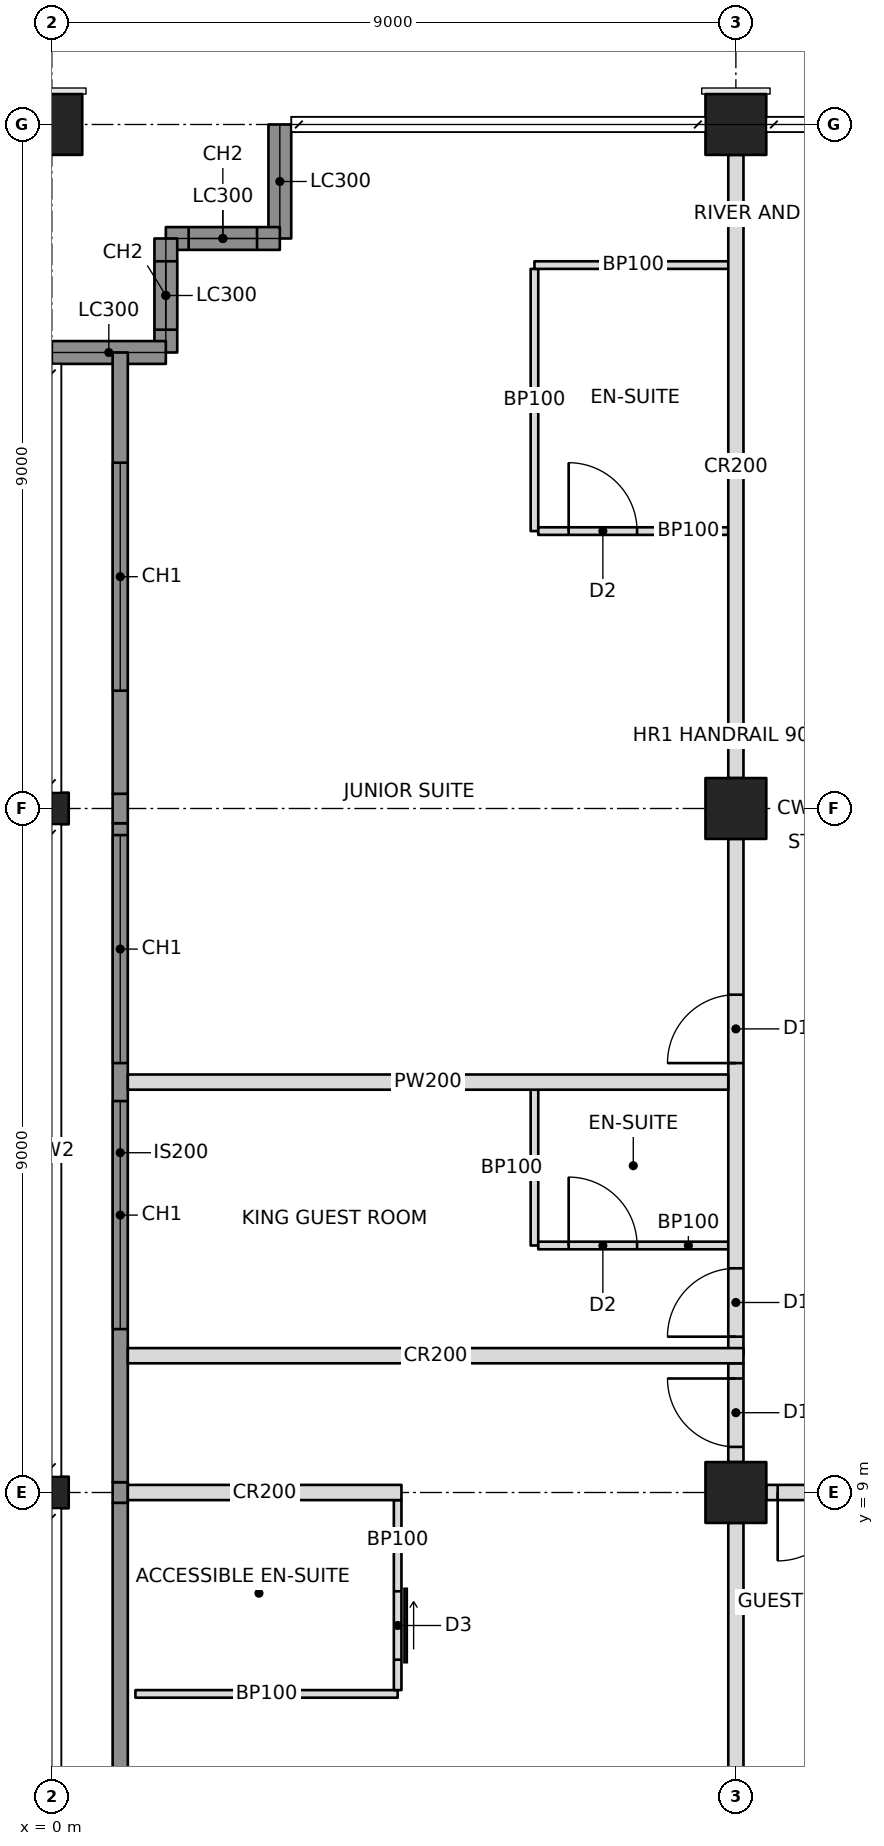
"""IFC4 building model, lengths in metres.
Left out: names, types, materials, properties, quantities, classifications, styles, units other than length and angle.
Written with IfcOpenShell. Run it as: python <this file> out.ifc"""

import sys

from ifc_helpers import new_model, si_unit, direction, frame, frame_2d, origin, origin_2d, place, context, subcontext, project, spatial, rectangle, hollow_rectangle, i_section, extrude, element, fill, save


model = new_model("IFC4")
c1 = context("Model", 3, precision=1e-05, world=origin(), true_north=direction((0.0, 1.0)))
c2 = subcontext(c1, "Body", "Model", "MODEL_VIEW")
j1 = project(units=[si_unit("LENGTHUNIT", "METRE"), si_unit("PLANEANGLEUNIT", "RADIAN")], contexts=[c1])
p1 = place(None, origin())
s1 = spatial("IfcSite", under=j1, at=p1, CompositionType="ELEMENT")
p2 = place(p1, origin())
s2 = spatial("IfcBuilding", under=s1, at=p2, CompositionType="ELEMENT")
p3 = place(p2, frame((0.0, 0.0, 248.2)))
s3 = spatial("IfcBuildingStorey", under=s2, at=p3, CompositionType="ELEMENT", Elevation=248.2)
for number, where, z_axis, x_axis in (
    (1, (0.0, 9.0, 0.0), (0.0, 0.0, 1.0), (0.0, 1.0, 0.0)),
    (2, (0.0, 18.0, 0.0), (0.0, 0.0, 1.0), (0.0, 1.0, 0.0)),
):
    element("IfcColumn", number, at=place(p3, frame(where, z_axis=z_axis, x_axis=x_axis)), inside=s3, PredefinedType="COLUMN", context=c2, shape_type="SweptSolid", body=[
        extrude(i_section(OverallWidth=0.417, OverallDepth=0.445, WebThickness=0.039, FlangeThickness=0.063, at=origin_2d()), origin(), (0.0, 0.0, 1.0), 3.6),
    ])
for number, where, z_axis, x_axis in (
    (3, (0.0, 27.0, 0.0), (0.0, 0.0, 1.0), (0.0, 1.0, 0.0)),
    (4, (9.0, 9.0, 0.0), (0.0, 0.0, 1.0), (1.0, 0.0, 0.0)),
    (5, (9.0, 18.0, 0.0), (0.0, 0.0, 1.0), (1.0, 0.0, 0.0)),
    (6, (9.0, 27.0, 0.0), (0.0, 0.0, 1.0), (1.0, 0.0, 0.0)),
):
    element("IfcColumn", number, at=place(p3, frame(where, z_axis=z_axis, x_axis=x_axis)), inside=s3, PredefinedType="COLUMN", context=c2, shape_type="SweptSolid", body=[
        extrude(hollow_rectangle(XDim=0.8, YDim=0.8, WallThickness=0.032, at=origin_2d()), origin(), (0.0, 0.0, 1.0), 3.6),
    ])
p4 = place(p3, frame((3.0, 27.0, 0.0), z_axis=(0.0, 0.0, 1.0), x_axis=(0.0, -1.0, 0.0)))
e7 = element("IfcWall", 7, at=p4, inside=s3, PredefinedType="SOLIDWALL", context=c2, shape_type="SweptSolid", body=[
    extrude(rectangle(XDim=1.5, YDim=0.3, at=frame_2d((0.75, 0.0))), origin(), (0.0, 0.0, 1.0), 2.62),
])
p5 = place(p3, frame((3.0, 25.5, 0.0), z_axis=(0.0, 0.0, 1.0), x_axis=(-1.0, 0.0, 0.0)))
e8 = element("IfcWall", 8, at=p5, inside=s3, PredefinedType="SOLIDWALL", context=c2, shape_type="SweptSolid", body=[
    extrude(rectangle(XDim=1.5, YDim=0.3, at=frame_2d((0.75, 0.0))), origin(), (0.0, 0.0, 1.0), 3.4),
])
p6 = place(p5, frame((0.3, 0.0, 0.6)))
e9 = element("IfcOpeningElement", 9, at=p6, cuts=e8, PredefinedType="OPENING", context=c2, shape_type="SweptSolid", body=[
    extrude(rectangle(XDim=0.9, YDim=2.2, at=frame_2d((0.45, 1.1))), frame((0.0, 0.16, 0.0), z_axis=(0.0, -1.0, 0.0), x_axis=(1.0, 0.0, 0.0)), (0.0, 0.0, 1.0), 0.32),
])
p7 = place(p3, frame((1.5, 25.5, 0.0), z_axis=(0.0, 0.0, 1.0), x_axis=(0.0, -1.0, 0.0)))
e10 = element("IfcWall", 10, at=p7, inside=s3, PredefinedType="SOLIDWALL", context=c2, shape_type="SweptSolid", body=[
    extrude(rectangle(XDim=1.5, YDim=0.3, at=frame_2d((0.75, 0.0))), origin(), (0.0, 0.0, 1.0), 3.4),
])
p8 = place(p7, frame((0.3, 0.0, 0.6)))
e11 = element("IfcOpeningElement", 11, at=p8, cuts=e10, PredefinedType="OPENING", context=c2, shape_type="SweptSolid", body=[
    extrude(rectangle(XDim=0.9, YDim=2.2, at=frame_2d((0.45, 1.1))), frame((0.0, 0.16, 0.0), z_axis=(0.0, -1.0, 0.0), x_axis=(1.0, 0.0, 0.0)), (0.0, 0.0, 1.0), 0.32),
])
p9 = place(p3, frame((1.5, 24.0, 0.0), z_axis=(0.0, 0.0, 1.0), x_axis=(-1.0, 0.0, 0.0)))
e12 = element("IfcWall", 12, at=p9, inside=s3, PredefinedType="SOLIDWALL", context=c2, shape_type="SweptSolid", body=[
    extrude(rectangle(XDim=1.5, YDim=0.3, at=frame_2d((0.75, 0.0))), origin(), (0.0, 0.0, 1.0), 2.62),
])
p10 = place(p3, frame((1.0, 9.0, 0.0), z_axis=(0.0, 0.0, 1.0), x_axis=(1.0, 0.0, 0.0)))
e13 = element("IfcWall", 13, at=p10, inside=s3, PredefinedType="PARTITIONING", context=c2, shape_type="SweptSolid", body=[
    extrude(rectangle(XDim=3.6, YDim=0.2, at=frame_2d((1.8, 0.0))), origin(), (0.0, 0.0, 1.0), 2.638),
])
p11 = place(p3, frame((9.4, 9.0, 0.0), z_axis=(0.0, 0.0, 1.0), x_axis=(1.0, 0.0, 0.0)))
e14 = element("IfcWall", 14, at=p11, inside=s3, PredefinedType="PARTITIONING", context=c2, shape_type="SweptSolid", body=[
    extrude(rectangle(XDim=8.2, YDim=0.2, at=frame_2d((4.1, 0.0))), origin(), (0.0, 0.0, 1.0), 2.605),
])
p12 = place(p11, frame((0.15, 0.0, 0.0)))
e15 = element("IfcOpeningElement", 15, at=p12, cuts=e14, PredefinedType="OPENING", context=c2, shape_type="SweptSolid", body=[
    extrude(rectangle(XDim=0.9, YDim=2.1, at=frame_2d((0.45, 1.05))), frame((0.0, 0.11, 0.0), z_axis=(0.0, -1.0, 0.0), x_axis=(1.0, 0.0, 0.0)), (0.0, 0.0, 1.0), 0.22),
])
p13 = place(p3, frame((9.0, 10.8, 0.0), z_axis=(0.0, 0.0, 1.0), x_axis=(0.0, 1.0, 0.0)))
e16 = element("IfcWall", 16, at=p13, inside=s3, PredefinedType="PARTITIONING", context=c2, shape_type="SweptSolid", body=[
    extrude(rectangle(XDim=6.8, YDim=0.2, at=frame_2d((3.4, 0.0))), origin(), (0.0, 0.0, 1.0), 2.605),
])
p14 = place(p13, frame((0.25, 0.0, 0.0)))
e17 = element("IfcOpeningElement", 17, at=p14, cuts=e16, PredefinedType="OPENING", context=c2, shape_type="SweptSolid", body=[
    extrude(rectangle(XDim=0.9, YDim=2.1, at=frame_2d((0.45, 1.05))), frame((0.0, 0.11, 0.0), z_axis=(0.0, -1.0, 0.0), x_axis=(1.0, 0.0, 0.0)), (0.0, 0.0, 1.0), 0.22),
])
p15 = place(p13, frame((3.85, 0.0, 0.0)))
e18 = element("IfcOpeningElement", 18, at=p15, cuts=e16, PredefinedType="OPENING", context=c2, shape_type="SweptSolid", body=[
    extrude(rectangle(XDim=0.9, YDim=2.1, at=frame_2d((0.45, 1.05))), frame((0.0, 0.11, 0.0), z_axis=(0.0, -1.0, 0.0), x_axis=(1.0, 0.0, 0.0)), (0.0, 0.0, 1.0), 0.22),
])
p16 = place(p3, frame((9.0, 18.4, 0.0), z_axis=(0.0, 0.0, 1.0), x_axis=(0.0, 1.0, 0.0)))
e19 = element("IfcWall", 19, at=p16, inside=s3, PredefinedType="PARTITIONING", context=c2, shape_type="SweptSolid", body=[
    extrude(rectangle(XDim=8.2, YDim=0.2, at=frame_2d((4.1, 0.0))), origin(), (0.0, 0.0, 1.0), 2.605),
])
p17 = place(p3, frame((1.0, 10.8, 0.0), z_axis=(0.0, 0.0, 1.0), x_axis=(1.0, 0.0, 0.0)))
e20 = element("IfcWall", 20, at=p17, inside=s3, PredefinedType="PARTITIONING", context=c2, shape_type="SweptSolid", body=[
    extrude(rectangle(XDim=8.1, YDim=0.2, at=frame_2d((4.05, 0.0))), origin(), (0.0, 0.0, 1.0), 2.604),
])
p18 = place(p3, frame((9.0, 8.6, 0.0), z_axis=(0.0, 0.0, 1.0), x_axis=(0.0, -1.0, 0.0)))
e21 = element("IfcWall", 21, at=p18, inside=s3, PredefinedType="PARTITIONING", context=c2, shape_type="SweptSolid", body=[
    extrude(rectangle(XDim=7.6, YDim=0.2, at=frame_2d((3.8, 0.0))), origin(), (0.0, 0.0, 1.0), 2.638),
])
p19 = place(p3, frame((1.1, 6.35, 0.0), z_axis=(0.0, 0.0, 1.0), x_axis=(1.0, 0.0, 0.0)))
e22 = element("IfcWall", 22, at=p19, inside=s3, PredefinedType="PARTITIONING", context=c2, shape_type="SweptSolid", body=[
    extrude(rectangle(XDim=3.45, YDim=0.1, at=frame_2d((1.725, 0.0))), origin(), (0.0, 0.0, 1.0), 3.4),
])
p20 = place(p3, frame((4.55, 8.9, 0.0), z_axis=(0.0, 0.0, 1.0), x_axis=(0.0, -1.0, 0.0)))
e23 = element("IfcWall", 23, at=p20, inside=s3, PredefinedType="PARTITIONING", context=c2, shape_type="SweptSolid", body=[
    extrude(rectangle(XDim=2.5, YDim=0.1, at=frame_2d((1.25, 0.0))), origin(), (0.0, 0.0, 1.0), 2.638),
])
p21 = place(p20, frame((1.2, 0.0, 0.0)))
e24 = element("IfcOpeningElement", 24, at=p21, cuts=e23, PredefinedType="OPENING", context=c2, shape_type="SweptSolid", body=[
    extrude(rectangle(XDim=0.9, YDim=2.1, at=frame_2d((0.45, 1.05))), frame((0.0, 0.06, 0.0), z_axis=(0.0, -1.0, 0.0), x_axis=(1.0, 0.0, 0.0)), (0.0, 0.0, 1.0), 0.12),
])
p22 = place(p3, frame((8.9, 14.4, 0.0), z_axis=(0.0, 0.0, 1.0), x_axis=(-1.0, 0.0, 0.0)))
e25 = element("IfcWall", 25, at=p22, inside=s3, PredefinedType="PARTITIONING", context=c2, shape_type="SweptSolid", body=[
    extrude(rectangle(XDim=7.9, YDim=0.2, at=frame_2d((3.95, 0.0))), origin(), (0.0, 0.0, 1.0), 2.604),
])
p23 = place(p3, frame((6.35, 12.25, 0.0), z_axis=(0.0, 0.0, 1.0), x_axis=(0.0, 1.0, 0.0)))
e26 = element("IfcWall", 26, at=p23, inside=s3, PredefinedType="PARTITIONING", context=c2, shape_type="SweptSolid", body=[
    extrude(rectangle(XDim=2.05, YDim=0.1, at=frame_2d((1.025, 0.0))), origin(), (0.0, 0.0, 1.0), 3.4),
])
p24 = place(p3, frame((8.9, 12.25, 0.0), z_axis=(0.0, 0.0, 1.0), x_axis=(-1.0, 0.0, 0.0)))
e27 = element("IfcWall", 27, at=p24, inside=s3, PredefinedType="PARTITIONING", context=c2, shape_type="SweptSolid", body=[
    extrude(rectangle(XDim=2.5, YDim=0.1, at=frame_2d((1.25, 0.0))), origin(), (0.0, 0.0, 1.0), 2.604),
])
p25 = place(p24, frame((1.2, 0.0, 0.0)))
e28 = element("IfcOpeningElement", 28, at=p25, cuts=e27, PredefinedType="OPENING", context=c2, shape_type="SweptSolid", body=[
    extrude(rectangle(XDim=0.9, YDim=2.1, at=frame_2d((0.45, 1.05))), frame((0.0, 0.06, 0.0), z_axis=(0.0, -1.0, 0.0), x_axis=(1.0, 0.0, 0.0)), (0.0, 0.0, 1.0), 0.12),
])
p26 = place(p3, frame((6.35, 21.65, 0.0), z_axis=(0.0, 0.0, 1.0), x_axis=(0.0, 1.0, 0.0)))
e29 = element("IfcWall", 29, at=p26, inside=s3, PredefinedType="PARTITIONING", context=c2, shape_type="SweptSolid", body=[
    extrude(rectangle(XDim=3.45, YDim=0.1, at=frame_2d((1.725, 0.0))), origin(), (0.0, 0.0, 1.0), 3.4),
])
p27 = place(p3, frame((8.9, 21.65, 0.0), z_axis=(0.0, 0.0, 1.0), x_axis=(-1.0, 0.0, 0.0)))
e30 = element("IfcWall", 30, at=p27, inside=s3, PredefinedType="PARTITIONING", context=c2, shape_type="SweptSolid", body=[
    extrude(rectangle(XDim=2.5, YDim=0.1, at=frame_2d((1.25, 0.0))), origin(), (0.0, 0.0, 1.0), 2.604),
])
p28 = place(p27, frame((1.2, 0.0, 0.0)))
e31 = element("IfcOpeningElement", 31, at=p28, cuts=e30, PredefinedType="OPENING", context=c2, shape_type="SweptSolid", body=[
    extrude(rectangle(XDim=0.9, YDim=2.1, at=frame_2d((0.45, 1.05))), frame((0.0, 0.06, 0.0), z_axis=(0.0, -1.0, 0.0), x_axis=(1.0, 0.0, 0.0)), (0.0, 0.0, 1.0), 0.12),
])
p29 = place(p3, frame((9.0, 9.4, 0.0), z_axis=(0.0, 0.0, 1.0), x_axis=(0.0, 1.0, 0.0)))
e32 = element("IfcWall", 32, at=p29, inside=s3, PredefinedType="PARTITIONING", context=c2, shape_type="SweptSolid", body=[
    extrude(rectangle(XDim=1.3, YDim=0.2, at=frame_2d((0.65, 0.0))), origin(), (0.0, 0.0, 1.0), 2.605),
])
p30 = place(p29, frame((0.2, 0.0, 0.0)))
e33 = element("IfcOpeningElement", 33, at=p30, cuts=e32, PredefinedType="OPENING", context=c2, shape_type="SweptSolid", body=[
    extrude(rectangle(XDim=0.9, YDim=2.1, at=frame_2d((0.45, 1.05))), frame((0.0, 0.11, 0.0), z_axis=(0.0, -1.0, 0.0), x_axis=(1.0, 0.0, 0.0)), (0.0, 0.0, 1.0), 0.22),
])
p31 = place(p3, frame((6.35, 25.15, 0.0), z_axis=(0.0, 0.0, 1.0), x_axis=(1.0, 0.0, 0.0)))
e34 = element("IfcWall", 34, at=p31, inside=s3, PredefinedType="PARTITIONING", context=c2, shape_type="SweptSolid", body=[
    extrude(rectangle(XDim=2.6, YDim=0.1, at=frame_2d((1.3, 0.0))), origin(), (0.0, 0.0, 1.0), 2.604),
])
p32 = place(p3, frame((0.9, 4.607, 0.0), z_axis=(0.0, 0.0, 1.0), x_axis=(0.0, 1.0, 0.0)))
e35 = element("IfcWall", 35, at=p32, inside=s3, PredefinedType="SOLIDWALL", context=c2, shape_type="SweptSolid", body=[
    extrude(rectangle(XDim=4.257, YDim=0.2, at=frame_2d((2.129, 0.0))), origin(), (0.0, 0.0, 1.0), 3.4),
])
p33 = place(p3, frame((0.9, 8.865, 0.0), z_axis=(0.0, 0.0, 1.0), x_axis=(0.0, 1.0, 0.0)))
e36 = element("IfcWall", 36, at=p33, inside=s3, PredefinedType="SOLIDWALL", context=c2, shape_type="SweptSolid", body=[
    extrude(rectangle(XDim=0.271, YDim=0.2, at=frame_2d((0.135, 0.0))), origin(), (0.0, 0.0, 1.0), 2.638),
])
p34 = place(p3, frame((0.9, 9.135, 0.0), z_axis=(0.0, 0.0, 1.0), x_axis=(0.0, 1.0, 0.0)))
e37 = element("IfcWall", 37, at=p34, inside=s3, PredefinedType="SOLIDWALL", context=c2, shape_type="SweptSolid", body=[
    extrude(rectangle(XDim=8.671, YDim=0.2, at=frame_2d((4.335, 0.0))), origin(), (0.0, 0.0, 1.0), 3.4),
])
p35 = place(p34, frame((2.015, 0.0, 0.6)))
e38 = element("IfcOpeningElement", 38, at=p35, cuts=e37, PredefinedType="OPENING", context=c2, shape_type="SweptSolid", body=[
    extrude(rectangle(XDim=3.0, YDim=2.2, at=frame_2d((1.5, 1.1))), frame((0.0, 0.11, 0.0), z_axis=(0.0, -1.0, 0.0), x_axis=(1.0, 0.0, 0.0)), (0.0, 0.0, 1.0), 0.22),
])
p36 = place(p34, frame((5.515, 0.0, 0.6)))
e39 = element("IfcOpeningElement", 39, at=p36, cuts=e37, PredefinedType="OPENING", context=c2, shape_type="SweptSolid", body=[
    extrude(rectangle(XDim=3.0, YDim=2.2, at=frame_2d((1.5, 1.1))), frame((0.0, 0.11, 0.0), z_axis=(0.0, -1.0, 0.0), x_axis=(1.0, 0.0, 0.0)), (0.0, 0.0, 1.0), 0.22),
])
p37 = place(p3, frame((0.9, 17.806, 0.0), z_axis=(0.0, 0.0, 1.0), x_axis=(0.0, 1.0, 0.0)))
e40 = element("IfcWall", 40, at=p37, inside=s3, PredefinedType="SOLIDWALL", context=c2, shape_type="SweptSolid", body=[
    extrude(rectangle(XDim=0.388, YDim=0.2, at=frame_2d((0.194, 0.0))), origin(), (0.0, 0.0, 1.0), 2.604),
])
p38 = place(p3, frame((0.9, 18.194, 0.0), z_axis=(0.0, 0.0, 1.0), x_axis=(0.0, 1.0, 0.0)))
e41 = element("IfcWall", 41, at=p38, inside=s3, PredefinedType="SOLIDWALL", context=c2, shape_type="SweptSolid", body=[
    extrude(rectangle(XDim=5.806, YDim=0.2, at=frame_2d((2.903, 0.0))), origin(), (0.0, 0.0, 1.0), 3.4),
])
p39 = place(p38, frame((1.356, 0.0, 0.6)))
e42 = element("IfcOpeningElement", 42, at=p39, cuts=e41, PredefinedType="OPENING", context=c2, shape_type="SweptSolid", body=[
    extrude(rectangle(XDim=3.0, YDim=2.2, at=frame_2d((1.5, 1.1))), frame((0.0, 0.11, 0.0), z_axis=(0.0, -1.0, 0.0), x_axis=(1.0, 0.0, 0.0)), (0.0, 0.0, 1.0), 0.22),
])
p40 = place(p6, origin())
e43 = element("IfcWindow", 43, at=p40, inside=s3, PartitioningType="SINGLE_PANEL", PredefinedType="WINDOW", context=c2, shape_type="SweptSolid", body=[
    extrude(rectangle(XDim=0.9, YDim=2.2, at=frame_2d((0.45, 1.1))), frame((0.0, 0.03, 0.0), z_axis=(0.0, -1.0, 0.0), x_axis=(1.0, 0.0, 0.0)), (0.0, 0.0, 1.0), 0.06),
])
fill(e9, e43)
p41 = place(p8, origin())
e44 = element("IfcWindow", 44, at=p41, inside=s3, PartitioningType="SINGLE_PANEL", PredefinedType="WINDOW", context=c2, shape_type="SweptSolid", body=[
    extrude(rectangle(XDim=0.9, YDim=2.2, at=frame_2d((0.45, 1.1))), frame((0.0, 0.03, 0.0), z_axis=(0.0, -1.0, 0.0), x_axis=(1.0, 0.0, 0.0)), (0.0, 0.0, 1.0), 0.06),
])
fill(e11, e44)
p42 = place(p35, origin())
e45 = element("IfcWindow", 45, at=p42, inside=s3, PartitioningType="TRIPLE_PANEL_VERTICAL", PredefinedType="WINDOW", context=c2, shape_type="SweptSolid", body=[
    extrude(rectangle(XDim=3.0, YDim=2.2, at=frame_2d((1.5, 1.1))), frame((0.0, 0.03, 0.0), z_axis=(0.0, -1.0, 0.0), x_axis=(1.0, 0.0, 0.0)), (0.0, 0.0, 1.0), 0.06),
])
fill(e38, e45)
p43 = place(p36, origin())
e46 = element("IfcWindow", 46, at=p43, inside=s3, PartitioningType="TRIPLE_PANEL_VERTICAL", PredefinedType="WINDOW", context=c2, shape_type="SweptSolid", body=[
    extrude(rectangle(XDim=3.0, YDim=2.2, at=frame_2d((1.5, 1.1))), frame((0.0, 0.03, 0.0), z_axis=(0.0, -1.0, 0.0), x_axis=(1.0, 0.0, 0.0)), (0.0, 0.0, 1.0), 0.06),
])
fill(e39, e46)
p44 = place(p39, origin())
e47 = element("IfcWindow", 47, at=p44, inside=s3, PartitioningType="TRIPLE_PANEL_VERTICAL", PredefinedType="WINDOW", context=c2, shape_type="SweptSolid", body=[
    extrude(rectangle(XDim=3.0, YDim=2.2, at=frame_2d((1.5, 1.1))), frame((0.0, 0.03, 0.0), z_axis=(0.0, -1.0, 0.0), x_axis=(1.0, 0.0, 0.0)), (0.0, 0.0, 1.0), 0.06),
])
fill(e42, e47)
p45 = place(p21, origin())
e48 = element("IfcDoor", 48, at=p45, inside=s3, OperationType="SLIDING_TO_LEFT", PredefinedType="DOOR", context=c2, shape_type="SweptSolid", body=[
    extrude(rectangle(XDim=0.9, YDim=2.1, at=frame_2d((0.45, 1.05))), frame((0.0, 0.025, 0.0), z_axis=(0.0, -1.0, 0.0), x_axis=(1.0, 0.0, 0.0)), (0.0, 0.0, 1.0), 0.05),
])
fill(e24, e48)
p46 = place(p12, frame((0.9, 0.0, 0.0), z_axis=(0.0, 0.0, 1.0), x_axis=(-1.0, 0.0, 0.0)))
e49 = element("IfcDoor", 49, at=p46, inside=s3, OperationType="SINGLE_SWING_RIGHT", PredefinedType="DOOR", context=c2, shape_type="SweptSolid", body=[
    extrude(rectangle(XDim=0.9, YDim=2.1, at=frame_2d((0.45, 1.05))), frame((0.0, 0.025, 0.0), z_axis=(0.0, -1.0, 0.0), x_axis=(1.0, 0.0, 0.0)), (0.0, 0.0, 1.0), 0.05),
])
fill(e15, e49)
p47 = place(p25, frame((0.9, 0.0, 0.0), z_axis=(0.0, 0.0, 1.0), x_axis=(-1.0, 0.0, 0.0)))
e50 = element("IfcDoor", 50, at=p47, inside=s3, OperationType="SINGLE_SWING_LEFT", PredefinedType="DOOR", context=c2, shape_type="SweptSolid", body=[
    extrude(rectangle(XDim=0.9, YDim=2.1, at=frame_2d((0.45, 1.05))), frame((0.0, 0.025, 0.0), z_axis=(0.0, -1.0, 0.0), x_axis=(1.0, 0.0, 0.0)), (0.0, 0.0, 1.0), 0.05),
])
fill(e28, e50)
p48 = place(p14, origin())
e51 = element("IfcDoor", 51, at=p48, inside=s3, OperationType="SINGLE_SWING_LEFT", PredefinedType="DOOR", context=c2, shape_type="SweptSolid", body=[
    extrude(rectangle(XDim=0.9, YDim=2.1, at=frame_2d((0.45, 1.05))), frame((0.0, 0.025, 0.0), z_axis=(0.0, -1.0, 0.0), x_axis=(1.0, 0.0, 0.0)), (0.0, 0.0, 1.0), 0.05),
])
fill(e17, e51)
p49 = place(p28, frame((0.9, 0.0, 0.0), z_axis=(0.0, 0.0, 1.0), x_axis=(-1.0, 0.0, 0.0)))
e52 = element("IfcDoor", 52, at=p49, inside=s3, OperationType="SINGLE_SWING_LEFT", PredefinedType="DOOR", context=c2, shape_type="SweptSolid", body=[
    extrude(rectangle(XDim=0.9, YDim=2.1, at=frame_2d((0.45, 1.05))), frame((0.0, 0.025, 0.0), z_axis=(0.0, -1.0, 0.0), x_axis=(1.0, 0.0, 0.0)), (0.0, 0.0, 1.0), 0.05),
])
fill(e31, e52)
p50 = place(p15, origin())
e53 = element("IfcDoor", 53, at=p50, inside=s3, OperationType="SINGLE_SWING_LEFT", PredefinedType="DOOR", context=c2, shape_type="SweptSolid", body=[
    extrude(rectangle(XDim=0.9, YDim=2.1, at=frame_2d((0.45, 1.05))), frame((0.0, 0.025, 0.0), z_axis=(0.0, -1.0, 0.0), x_axis=(1.0, 0.0, 0.0)), (0.0, 0.0, 1.0), 0.05),
])
fill(e18, e53)
p51 = place(p30, origin())
e54 = element("IfcDoor", 54, at=p51, inside=s3, OperationType="SINGLE_SWING_RIGHT", PredefinedType="DOOR", context=c2, shape_type="SweptSolid", body=[
    extrude(rectangle(XDim=0.9, YDim=2.1, at=frame_2d((0.45, 1.05))), frame((0.0, 0.025, 0.0), z_axis=(0.0, -1.0, 0.0), x_axis=(1.0, 0.0, 0.0)), (0.0, 0.0, 1.0), 0.05),
])
fill(e33, e54)
save(model, sys.argv[1])
